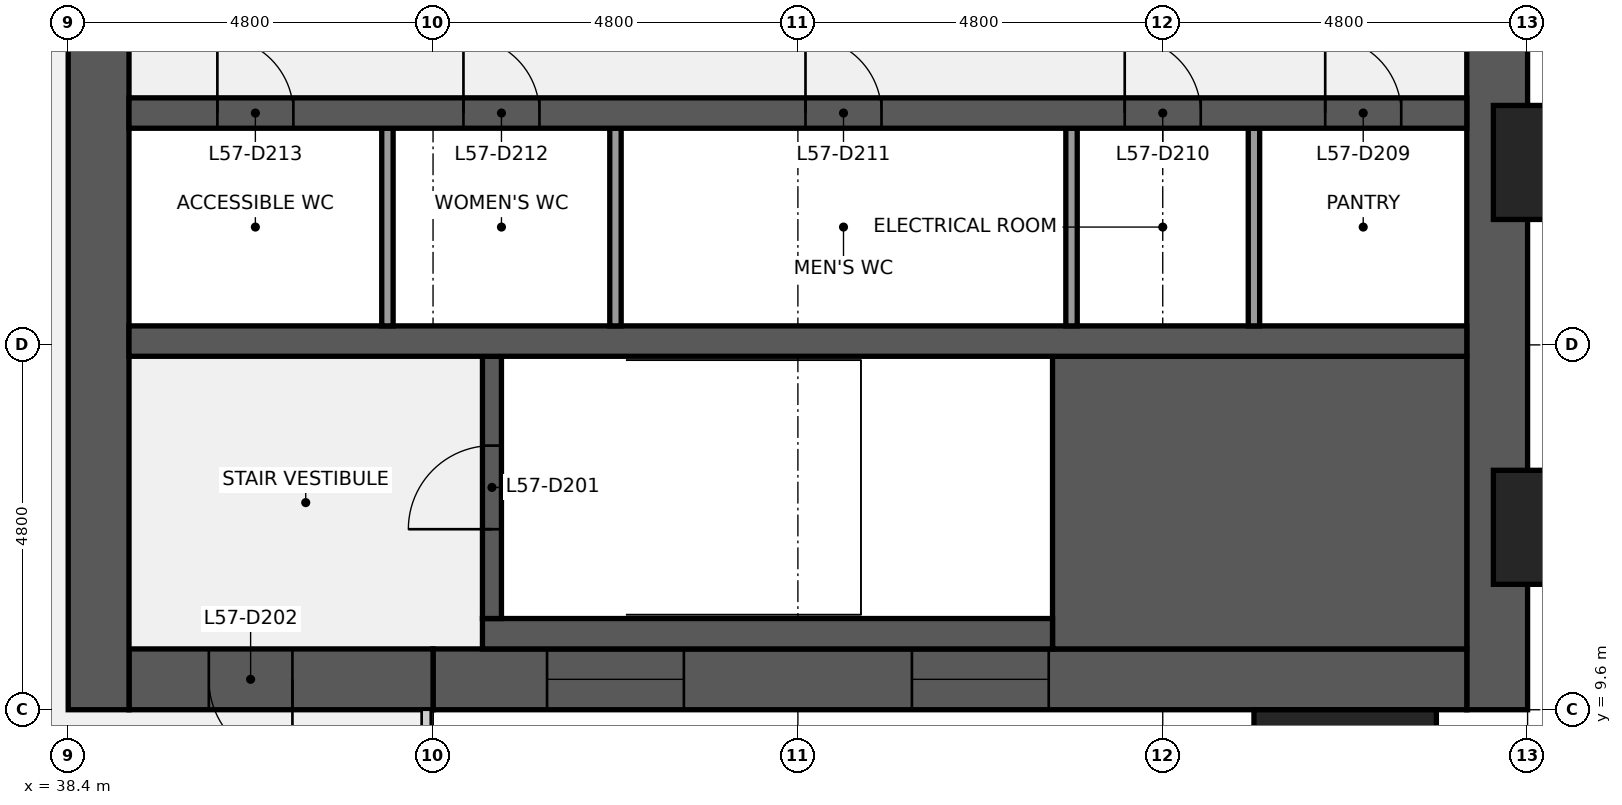
"""IFC4 building model, lengths in metres.
Left out: names, types, materials, properties, quantities, classifications, styles, units other than length and angle.
Written with IfcOpenShell. Run it as: python <this file> out.ifc"""

import sys

from ifc_helpers import new_model, si_unit, direction, frame, frame_2d, origin, origin_2d, place, context, subcontext, project, spatial, rectangle, extrude, element, fill, save


model = new_model("IFC4")
c1 = context("Model", 3, precision=1e-05, world=origin(), true_north=direction((0.0, 1.0)))
c2 = subcontext(c1, "Body", "Model", "MODEL_VIEW")
j1 = project(units=[si_unit("LENGTHUNIT", "METRE"), si_unit("PLANEANGLEUNIT", "RADIAN")], contexts=[c1])
p1 = place(None, origin())
s1 = spatial("IfcSite", under=j1, at=p1, CompositionType="ELEMENT")
p2 = place(p1, origin())
s2 = spatial("IfcBuilding", under=s1, at=p2, CompositionType="ELEMENT")
p3 = place(p2, frame((0.0, 0.0, 257.2)))
s3 = spatial("IfcBuildingStorey", under=s2, at=p3, CompositionType="ELEMENT", Elevation=257.2)
p4 = place(p3, frame((57.2, 38.4, 0.0), z_axis=(0.0, 0.0, 1.0), x_axis=(0.0, -1.0, 0.0)))
e1 = element("IfcWall", 1, at=p4, inside=s3, PredefinedType="SHEAR", context=c2, shape_type="SweptSolid", body=[
    extrude(rectangle(XDim=28.8, YDim=0.8, at=frame_2d((14.4, 0.0))), origin(), (0.0, 0.0, 1.0), 3.84),
])
p5 = place(p4, frame((18.45, 0.0, 0.9)))
e2 = element("IfcOpeningElement", 2, at=p5, cuts=e1, PredefinedType="OPENING", context=c2, shape_type="SweptSolid", body=[
    extrude(rectangle(XDim=1.5, YDim=1.5, at=frame_2d((0.75, 0.75))), frame((0.0, 0.41, 0.0), z_axis=(0.0, -1.0, 0.0), x_axis=(1.0, 0.0, 0.0)), (0.0, 0.0, 1.0), 0.82),
])
p6 = place(p4, frame((8.85, 0.0, 0.9)))
e3 = element("IfcOpeningElement", 3, at=p6, cuts=e1, PredefinedType="OPENING", context=c2, shape_type="SweptSolid", body=[
    extrude(rectangle(XDim=1.5, YDim=1.5, at=frame_2d((0.75, 0.75))), frame((0.0, 0.41, 0.0), z_axis=(0.0, -1.0, 0.0), x_axis=(1.0, 0.0, 0.0)), (0.0, 0.0, 1.0), 0.82),
])
p7 = place(p3, frame((56.8, 10.0, 0.0), z_axis=(0.0, 0.0, 1.0), x_axis=(-1.0, 0.0, 0.0)))
e4 = element("IfcWall", 4, at=p7, inside=s3, PredefinedType="SHEAR", context=c2, shape_type="SweptSolid", body=[
    extrude(rectangle(XDim=13.6, YDim=0.8, at=frame_2d((6.8, 0.0))), origin(), (0.0, 0.0, 1.0), 3.84),
])
p8 = place(p7, frame((5.5, 0.0, 0.9)))
e5 = element("IfcOpeningElement", 5, at=p8, cuts=e4, PredefinedType="OPENING", context=c2, shape_type="SweptSolid", body=[
    extrude(rectangle(XDim=1.8, YDim=1.5, at=frame_2d((0.9, 0.75))), frame((0.0, 0.41, 0.0), z_axis=(0.0, -1.0, 0.0), x_axis=(1.0, 0.0, 0.0)), (0.0, 0.0, 1.0), 0.82),
])
p9 = place(p7, frame((10.3, 0.0, 0.9)))
e6 = element("IfcOpeningElement", 6, at=p9, cuts=e4, PredefinedType="OPENING", context=c2, shape_type="SweptSolid", body=[
    extrude(rectangle(XDim=1.8, YDim=1.5, at=frame_2d((0.9, 0.75))), frame((0.0, 0.41, 0.0), z_axis=(0.0, -1.0, 0.0), x_axis=(1.0, 0.0, 0.0)), (0.0, 0.0, 1.0), 0.82),
])
p10 = place(p3, frame((43.2, 10.0, 0.0), z_axis=(0.0, 0.0, 1.0), x_axis=(-1.0, 0.0, 0.0)))
e7 = element("IfcWall", 7, at=p10, inside=s3, PredefinedType="SHEAR", context=c2, shape_type="SweptSolid", body=[
    extrude(rectangle(XDim=4.0, YDim=0.8, at=frame_2d((2.0, 0.0))), origin(), (0.0, 0.0, 1.0), 3.84),
])
p11 = place(p10, frame((1.85, 0.0, 0.0)))
e8 = element("IfcOpeningElement", 8, at=p11, cuts=e7, PredefinedType="OPENING", context=c2, shape_type="SweptSolid", body=[
    extrude(rectangle(XDim=1.1, YDim=2.1, at=frame_2d((0.55, 1.05))), frame((0.0, 0.41, 0.0), z_axis=(0.0, -1.0, 0.0), x_axis=(1.0, 0.0, 0.0)), (0.0, 0.0, 1.0), 0.82),
])
p12 = place(p3, frame((38.8, 9.6, 0.0), z_axis=(0.0, 0.0, 1.0), x_axis=(0.0, 1.0, 0.0)))
e9 = element("IfcWall", 9, at=p12, inside=s3, PredefinedType="SHEAR", context=c2, shape_type="SweptSolid", body=[
    extrude(rectangle(XDim=28.8, YDim=0.8, at=frame_2d((14.4, 0.0))), origin(), (0.0, 0.0, 1.0), 3.84),
])
p13 = place(p12, frame((8.7, 0.0, 0.0)))
e10 = element("IfcOpeningElement", 10, at=p13, cuts=e9, PredefinedType="OPENING", context=c2, shape_type="SweptSolid", body=[
    extrude(rectangle(XDim=1.8, YDim=2.1, at=frame_2d((0.9, 1.05))), frame((0.0, 0.41, 0.0), z_axis=(0.0, -1.0, 0.0), x_axis=(1.0, 0.0, 0.0)), (0.0, 0.0, 1.0), 0.82),
])
p14 = place(p12, frame((18.3, 0.0, 0.0)))
e11 = element("IfcOpeningElement", 11, at=p14, cuts=e9, PredefinedType="OPENING", context=c2, shape_type="SweptSolid", body=[
    extrude(rectangle(XDim=1.8, YDim=2.1, at=frame_2d((0.9, 1.05))), frame((0.0, 0.41, 0.0), z_axis=(0.0, -1.0, 0.0), x_axis=(1.0, 0.0, 0.0)), (0.0, 0.0, 1.0), 0.82),
])
p15 = place(p3, frame((51.35, 12.325, 0.0), z_axis=(0.0, 0.0, 1.0), x_axis=(1.0, 0.0, 0.0)))
e12 = element("IfcWall", 12, at=p15, inside=s3, PredefinedType="SHEAR", context=c2, shape_type="SweptSolid", body=[
    extrude(rectangle(XDim=5.45, YDim=3.85, at=frame_2d((2.725, 0.0))), origin(), (0.0, 0.0, 1.0), 3.84),
])
p16 = place(p3, frame((43.85, 10.6, 0.0), z_axis=(0.0, 0.0, 1.0), x_axis=(1.0, 0.0, 0.0)))
e13 = element("IfcWall", 13, at=p16, inside=s3, PredefinedType="SHEAR", context=c2, shape_type="SweptSolid", body=[
    extrude(rectangle(XDim=7.5, YDim=0.4, at=frame_2d((3.75, 0.0))), origin(), (0.0, 0.0, 1.0), 3.84),
])
p17 = place(p3, frame((43.975, 10.8, 0.0), z_axis=(0.0, 0.0, 1.0), x_axis=(0.0, 1.0, 0.0)))
e14 = element("IfcWall", 14, at=p17, inside=s3, PredefinedType="SHEAR", context=c2, shape_type="SweptSolid", body=[
    extrude(rectangle(XDim=3.45, YDim=0.25, at=frame_2d((1.725, 0.0))), origin(), (0.0, 0.0, 1.0), 3.84),
])
p18 = place(p17, frame((1.175, 0.0, 0.0)))
e15 = element("IfcOpeningElement", 15, at=p18, cuts=e14, PredefinedType="OPENING", context=c2, shape_type="SweptSolid", body=[
    extrude(rectangle(XDim=1.1, YDim=2.1, at=frame_2d((0.55, 1.05))), frame((0.0, 0.135, 0.0), z_axis=(0.0, -1.0, 0.0), x_axis=(1.0, 0.0, 0.0)), (0.0, 0.0, 1.0), 0.27),
])
p19 = place(p3, frame((39.2, 14.45, 0.0), z_axis=(0.0, 0.0, 1.0), x_axis=(1.0, 0.0, 0.0)))
e16 = element("IfcWall", 16, at=p19, inside=s3, PredefinedType="SHEAR", context=c2, shape_type="SweptSolid", body=[
    extrude(rectangle(XDim=17.6, YDim=0.4, at=frame_2d((8.8, 0.0))), origin(), (0.0, 0.0, 1.0), 3.84),
])
for number, where, z_axis, x_axis in (
    (17, (54.0, 14.65, 0.0), (0.0, 0.0, 1.0), (0.0, 1.0, 0.0)),
    (18, (51.6, 14.65, 0.0), (0.0, 0.0, 1.0), (0.0, 1.0, 0.0)),
    (19, (45.6, 14.65, 0.0), (0.0, 0.0, 1.0), (0.0, 1.0, 0.0)),
    (20, (42.6, 14.65, 0.0), (0.0, 0.0, 1.0), (0.0, 1.0, 0.0)),
):
    element("IfcWall", number, at=place(p3, frame(where, z_axis=z_axis, x_axis=x_axis)), inside=s3, PredefinedType="PARTITIONING", context=c2, shape_type="SweptSolid", body=[
        extrude(rectangle(XDim=2.6, YDim=0.15, at=frame_2d((1.3, 0.0))), origin(), (0.0, 0.0, 1.0), 3.84),
    ])
p20 = place(p3, frame((39.2, 17.45, 0.0), z_axis=(0.0, 0.0, 1.0), x_axis=(1.0, 0.0, 0.0)))
e21 = element("IfcWall", 21, at=p20, inside=s3, PredefinedType="SHEAR", context=c2, shape_type="SweptSolid", body=[
    extrude(rectangle(XDim=17.6, YDim=0.4, at=frame_2d((8.8, 0.0))), origin(), (0.0, 0.0, 1.0), 3.84),
])
p21 = place(p20, frame((15.738, 0.0, 0.0)))
e22 = element("IfcOpeningElement", 22, at=p21, cuts=e21, PredefinedType="OPENING", context=c2, shape_type="SweptSolid", body=[
    extrude(rectangle(XDim=1.0, YDim=2.1, at=frame_2d((0.5, 1.05))), frame((0.0, 0.21, 0.0), z_axis=(0.0, -1.0, 0.0), x_axis=(1.0, 0.0, 0.0)), (0.0, 0.0, 1.0), 0.42),
])
p22 = place(p20, frame((13.1, 0.0, 0.0)))
e23 = element("IfcOpeningElement", 23, at=p22, cuts=e21, PredefinedType="OPENING", context=c2, shape_type="SweptSolid", body=[
    extrude(rectangle(XDim=1.0, YDim=2.1, at=frame_2d((0.5, 1.05))), frame((0.0, 0.21, 0.0), z_axis=(0.0, -1.0, 0.0), x_axis=(1.0, 0.0, 0.0)), (0.0, 0.0, 1.0), 0.42),
])
p23 = place(p20, frame((8.9, 0.0, 0.0)))
e24 = element("IfcOpeningElement", 24, at=p23, cuts=e21, PredefinedType="OPENING", context=c2, shape_type="SweptSolid", body=[
    extrude(rectangle(XDim=1.0, YDim=2.1, at=frame_2d((0.5, 1.05))), frame((0.0, 0.21, 0.0), z_axis=(0.0, -1.0, 0.0), x_axis=(1.0, 0.0, 0.0)), (0.0, 0.0, 1.0), 0.42),
])
p24 = place(p20, frame((4.4, 0.0, 0.0)))
e25 = element("IfcOpeningElement", 25, at=p24, cuts=e21, PredefinedType="OPENING", context=c2, shape_type="SweptSolid", body=[
    extrude(rectangle(XDim=1.0, YDim=2.1, at=frame_2d((0.5, 1.05))), frame((0.0, 0.21, 0.0), z_axis=(0.0, -1.0, 0.0), x_axis=(1.0, 0.0, 0.0)), (0.0, 0.0, 1.0), 0.42),
])
p25 = place(p20, frame((1.163, 0.0, 0.0)))
e26 = element("IfcOpeningElement", 26, at=p25, cuts=e21, PredefinedType="OPENING", context=c2, shape_type="SweptSolid", body=[
    extrude(rectangle(XDim=1.0, YDim=2.1, at=frame_2d((0.5, 1.05))), frame((0.0, 0.21, 0.0), z_axis=(0.0, -1.0, 0.0), x_axis=(1.0, 0.0, 0.0)), (0.0, 0.0, 1.0), 0.42),
])
for number, where, z_axis, x_axis in (
    (27, (55.2, 8.85, 0.0), (0.0, 0.0, 1.0), (1.0, 0.0, 0.0)),
    (28, (58.35, 12.0, 0.0), (0.0, 0.0, 1.0), (0.0, 1.0, 0.0)),
    (29, (58.35, 16.8, 0.0), (0.0, 0.0, 1.0), (0.0, 1.0, 0.0)),
):
    element("IfcColumn", number, at=place(p3, frame(where, z_axis=z_axis, x_axis=x_axis)), inside=s3, PredefinedType="PILASTER", context=c2, shape_type="SweptSolid", body=[
        extrude(rectangle(XDim=2.4, YDim=1.5, at=origin_2d()), origin(), (0.0, 0.0, 1.0), 4.0),
    ])
p26 = place(p18, origin())
e30 = element("IfcDoor", 30, at=p26, inside=s3, OperationType="SINGLE_SWING_LEFT", PredefinedType="DOOR", context=c2, shape_type="SweptSolid", body=[
    extrude(rectangle(XDim=1.1, YDim=2.1, at=frame_2d((0.55, 1.05))), frame((0.0, 0.025, 0.0), z_axis=(0.0, -1.0, 0.0), x_axis=(1.0, 0.0, 0.0)), (0.0, 0.0, 1.0), 0.05),
])
fill(e15, e30)
p27 = place(p11, origin())
e31 = element("IfcDoor", 31, at=p27, inside=s3, OperationType="SINGLE_SWING_LEFT", PredefinedType="DOOR", context=c2, shape_type="SweptSolid", body=[
    extrude(rectangle(XDim=1.1, YDim=2.1, at=frame_2d((0.55, 1.05))), frame((0.0, 0.025, 0.0), z_axis=(0.0, -1.0, 0.0), x_axis=(1.0, 0.0, 0.0)), (0.0, 0.0, 1.0), 0.05),
])
fill(e8, e31)
p28 = place(p21, origin())
e32 = element("IfcDoor", 32, at=p28, inside=s3, OperationType="SINGLE_SWING_LEFT", PredefinedType="DOOR", context=c2, shape_type="SweptSolid", body=[
    extrude(rectangle(XDim=1.0, YDim=2.1, at=frame_2d((0.5, 1.05))), frame((0.0, 0.025, 0.0), z_axis=(0.0, -1.0, 0.0), x_axis=(1.0, 0.0, 0.0)), (0.0, 0.0, 1.0), 0.05),
])
fill(e22, e32)
p29 = place(p22, origin())
e33 = element("IfcDoor", 33, at=p29, inside=s3, OperationType="SINGLE_SWING_LEFT", PredefinedType="DOOR", context=c2, shape_type="SweptSolid", body=[
    extrude(rectangle(XDim=1.0, YDim=2.1, at=frame_2d((0.5, 1.05))), frame((0.0, 0.025, 0.0), z_axis=(0.0, -1.0, 0.0), x_axis=(1.0, 0.0, 0.0)), (0.0, 0.0, 1.0), 0.05),
])
fill(e23, e33)
p30 = place(p23, origin())
e34 = element("IfcDoor", 34, at=p30, inside=s3, OperationType="SINGLE_SWING_LEFT", PredefinedType="DOOR", context=c2, shape_type="SweptSolid", body=[
    extrude(rectangle(XDim=1.0, YDim=2.1, at=frame_2d((0.5, 1.05))), frame((0.0, 0.025, 0.0), z_axis=(0.0, -1.0, 0.0), x_axis=(1.0, 0.0, 0.0)), (0.0, 0.0, 1.0), 0.05),
])
fill(e24, e34)
p31 = place(p24, origin())
e35 = element("IfcDoor", 35, at=p31, inside=s3, OperationType="SINGLE_SWING_LEFT", PredefinedType="DOOR", context=c2, shape_type="SweptSolid", body=[
    extrude(rectangle(XDim=1.0, YDim=2.1, at=frame_2d((0.5, 1.05))), frame((0.0, 0.025, 0.0), z_axis=(0.0, -1.0, 0.0), x_axis=(1.0, 0.0, 0.0)), (0.0, 0.0, 1.0), 0.05),
])
fill(e25, e35)
p32 = place(p25, origin())
e36 = element("IfcDoor", 36, at=p32, inside=s3, OperationType="SINGLE_SWING_LEFT", PredefinedType="DOOR", context=c2, shape_type="SweptSolid", body=[
    extrude(rectangle(XDim=1.0, YDim=2.1, at=frame_2d((0.5, 1.05))), frame((0.0, 0.025, 0.0), z_axis=(0.0, -1.0, 0.0), x_axis=(1.0, 0.0, 0.0)), (0.0, 0.0, 1.0), 0.05),
])
fill(e26, e36)
p33 = place(p8, origin())
e37 = element("IfcWindow", 37, at=p33, inside=s3, PartitioningType="SINGLE_PANEL", PredefinedType="WINDOW", context=c2, shape_type="SweptSolid", body=[
    extrude(rectangle(XDim=1.8, YDim=1.5, at=frame_2d((0.9, 0.75))), frame((0.0, 0.03, 0.0), z_axis=(0.0, -1.0, 0.0), x_axis=(1.0, 0.0, 0.0)), (0.0, 0.0, 1.0), 0.06),
])
fill(e5, e37)
p34 = place(p9, origin())
e38 = element("IfcWindow", 38, at=p34, inside=s3, PartitioningType="SINGLE_PANEL", PredefinedType="WINDOW", context=c2, shape_type="SweptSolid", body=[
    extrude(rectangle(XDim=1.8, YDim=1.5, at=frame_2d((0.9, 0.75))), frame((0.0, 0.03, 0.0), z_axis=(0.0, -1.0, 0.0), x_axis=(1.0, 0.0, 0.0)), (0.0, 0.0, 1.0), 0.06),
])
fill(e6, e38)
save(model, sys.argv[1])
